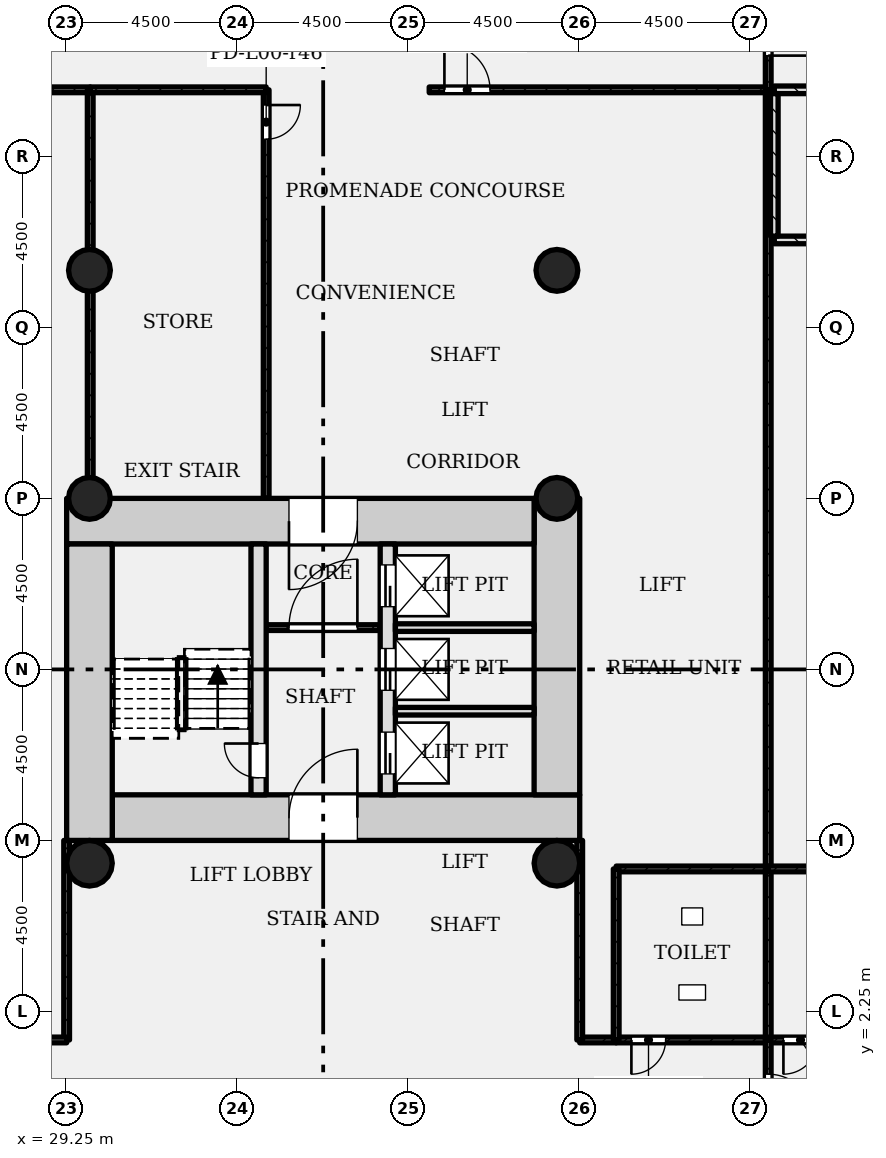
"""IFC4 building model, lengths in metres.
Left out: names, types, materials, properties, quantities, classifications, styles, units other than length and angle.
Written with IfcOpenShell. Run it as: python <this file> out.ifc"""

import sys

from ifc_helpers import new_model, si_unit, direction, frame, frame_2d, origin, origin_2d, place, context, subcontext, project, spatial, rectangle, hollow_circle, extrude, element, fill, save


model = new_model("IFC4")
c1 = context("Model", 3, precision=1e-05, world=origin(), true_north=direction((0.0, 1.0)))
c2 = subcontext(c1, "Body", "Model", "MODEL_VIEW")
j1 = project(units=[si_unit("LENGTHUNIT", "METRE"), si_unit("PLANEANGLEUNIT", "RADIAN")], contexts=[c1])
p1 = place(None, origin())
s1 = spatial("IfcSite", under=j1, at=p1, CompositionType="ELEMENT")
p2 = place(p1, origin())
s2 = spatial("IfcBuilding", under=s1, at=p2, CompositionType="ELEMENT")
p3 = place(p2, origin())
s3 = spatial("IfcBuildingStorey", under=s2, at=p3, CompositionType="ELEMENT", Elevation=0.0)
p4 = place(p3, frame((30.45, 7.35, -0.4), z_axis=(0.0, 0.0, 1.0), x_axis=(1.0, 0.0, 0.0)))
e1 = element("IfcWall", 1, at=p4, inside=s3, PredefinedType="SHEAR", context=c2, shape_type="SweptSolid", body=[
    extrude(rectangle(XDim=12.3, YDim=1.2, at=frame_2d((6.15, 0.0))), origin(), (0.0, 0.0, 1.0), 6.4),
])
p5 = place(p4, frame((4.65, 0.0, 0.4)))
e2 = element("IfcOpeningElement", 2, at=p5, cuts=e1, PredefinedType="OPENING", context=c2, shape_type="SweptSolid", body=[
    extrude(rectangle(XDim=1.8, YDim=2.1, at=frame_2d((0.9, 1.05))), frame((0.0, 0.61, 0.0), z_axis=(0.0, -1.0, 0.0), x_axis=(1.0, 0.0, 0.0)), (0.0, 0.0, 1.0), 1.22),
])
p6 = place(p3, frame((42.15, 7.95, -0.4), z_axis=(0.0, 0.0, 1.0), x_axis=(0.0, 1.0, 0.0)))
e3 = element("IfcWall", 3, at=p6, inside=s3, PredefinedType="SHEAR", context=c2, shape_type="SweptSolid", body=[
    extrude(rectangle(XDim=7.8, YDim=1.2, at=frame_2d((3.9, 0.0))), origin(), (0.0, 0.0, 1.0), 6.4),
])
p7 = place(p3, frame((41.55, 15.15, -0.4), z_axis=(0.0, 0.0, 1.0), x_axis=(-1.0, 0.0, 0.0)))
e4 = element("IfcWall", 4, at=p7, inside=s3, PredefinedType="SHEAR", context=c2, shape_type="SweptSolid", body=[
    extrude(rectangle(XDim=12.3, YDim=1.2, at=frame_2d((6.15, 0.0))), origin(), (0.0, 0.0, 1.0), 6.4),
])
p8 = place(p7, frame((4.65, 0.0, 0.4)))
e5 = element("IfcOpeningElement", 5, at=p8, cuts=e4, PredefinedType="OPENING", context=c2, shape_type="SweptSolid", body=[
    extrude(rectangle(XDim=1.8, YDim=2.1, at=frame_2d((0.9, 1.05))), frame((0.0, 0.61, 0.0), z_axis=(0.0, -1.0, 0.0), x_axis=(1.0, 0.0, 0.0)), (0.0, 0.0, 1.0), 1.22),
])
p9 = place(p3, frame((29.85, 14.55, -0.4), z_axis=(0.0, 0.0, 1.0), x_axis=(0.0, -1.0, 0.0)))
e6 = element("IfcWall", 6, at=p9, inside=s3, PredefinedType="SHEAR", context=c2, shape_type="SweptSolid", body=[
    extrude(rectangle(XDim=7.8, YDim=1.2, at=frame_2d((3.9, 0.0))), origin(), (0.0, 0.0, 1.0), 6.4),
])
p10 = place(p3, frame((34.3, 7.95, -0.4), z_axis=(0.0, 0.0, 1.0), x_axis=(0.0, 1.0, 0.0)))
e7 = element("IfcWall", 7, at=p10, inside=s3, PredefinedType="SHEAR", context=c2, shape_type="SweptSolid", body=[
    extrude(rectangle(XDim=6.6, YDim=0.4, at=frame_2d((3.3, 0.0))), origin(), (0.0, 0.0, 1.0), 6.4),
])
p11 = place(p10, frame((0.45, 0.0, 0.4)))
e8 = element("IfcOpeningElement", 8, at=p11, cuts=e7, PredefinedType="OPENING", context=c2, shape_type="SweptSolid", body=[
    extrude(rectangle(XDim=0.9, YDim=2.1, at=frame_2d((0.45, 1.05))), frame((0.0, 0.21, 0.0), z_axis=(0.0, -1.0, 0.0), x_axis=(1.0, 0.0, 0.0)), (0.0, 0.0, 1.0), 0.42),
])
p12 = place(p3, frame((37.7, 7.95, -0.4), z_axis=(0.0, 0.0, 1.0), x_axis=(0.0, 1.0, 0.0)))
e9 = element("IfcWall", 9, at=p12, inside=s3, PredefinedType="SHEAR", context=c2, shape_type="SweptSolid", body=[
    extrude(rectangle(XDim=6.6, YDim=0.4, at=frame_2d((3.3, 0.0))), origin(), (0.0, 0.0, 1.0), 6.4),
])
p13 = place(p12, frame((0.55, 0.0, 0.4)))
e10 = element("IfcOpeningElement", 10, at=p13, cuts=e9, PredefinedType="OPENING", context=c2, shape_type="SweptSolid", body=[
    extrude(rectangle(XDim=1.1, YDim=2.1, at=frame_2d((0.55, 1.05))), frame((0.0, 0.21, 0.0), z_axis=(0.0, -1.0, 0.0), x_axis=(1.0, 0.0, 0.0)), (0.0, 0.0, 1.0), 0.42),
])
p14 = place(p12, frame((2.75, 0.0, 0.4)))
e11 = element("IfcOpeningElement", 11, at=p14, cuts=e9, PredefinedType="OPENING", context=c2, shape_type="SweptSolid", body=[
    extrude(rectangle(XDim=1.1, YDim=2.1, at=frame_2d((0.55, 1.05))), frame((0.0, 0.21, 0.0), z_axis=(0.0, -1.0, 0.0), x_axis=(1.0, 0.0, 0.0)), (0.0, 0.0, 1.0), 0.42),
])
p15 = place(p12, frame((4.95, 0.0, 0.4)))
e12 = element("IfcOpeningElement", 12, at=p15, cuts=e9, PredefinedType="OPENING", context=c2, shape_type="SweptSolid", body=[
    extrude(rectangle(XDim=1.1, YDim=2.1, at=frame_2d((0.55, 1.05))), frame((0.0, 0.21, 0.0), z_axis=(0.0, -1.0, 0.0), x_axis=(1.0, 0.0, 0.0)), (0.0, 0.0, 1.0), 0.42),
])
for number, where, z_axis, x_axis in (
    (13, (42.15, 15.75, -0.4), (0.0, 0.0, 1.0), (1.0, 0.0, 0.0)),
    (14, (29.85, 15.75, -0.4), (0.0, 0.0, 1.0), (1.0, 0.0, 0.0)),
    (15, (42.15, 21.75, -0.4), (0.0, 0.0, 1.0), (1.0, 0.0, 0.0)),
    (16, (29.85, 21.75, -0.4), (0.0, 0.0, 1.0), (1.0, 0.0, 0.0)),
):
    element("IfcColumn", number, at=place(p3, frame(where, z_axis=z_axis, x_axis=x_axis)), inside=s3, PredefinedType="COLUMN", context=c2, shape_type="SweptSolid", body=[
        extrude(hollow_circle(Radius=0.55, WallThickness=0.04, at=origin_2d()), origin(), (0.0, 0.0, 1.0), 6.4),
    ])
for number, where, z_axis, x_axis in (
    (17, (42.15, 6.15, -0.4), (0.0, 0.0, 1.0), (1.0, 0.0, 0.0)),
    (18, (29.85, 6.15, -0.4), (0.0, 0.0, 1.0), (1.0, 0.0, 0.0)),
):
    element("IfcColumn", number, at=place(p3, frame(where, z_axis=z_axis, x_axis=x_axis)), inside=s3, PredefinedType="COLUMN", context=c2, shape_type="SweptSolid", body=[
        extrude(hollow_circle(Radius=0.6, WallThickness=0.045, at=origin_2d()), origin(), (0.0, 0.0, 1.0), 6.4),
    ])
p16 = place(p3, frame((37.5, 12.35, 0.0), z_axis=(0.0, 0.0, 1.0), x_axis=(-1.0, 0.0, 0.0)))
e19 = element("IfcWall", 19, at=p16, inside=s3, PredefinedType="PARTITIONING", context=c2, shape_type="SweptSolid", body=[
    extrude(rectangle(XDim=3.0, YDim=0.15, at=frame_2d((1.5, 0.0))), origin(), (0.0, 0.0, 1.0), 5.58),
])
p17 = place(p16, frame((0.6, 0.0, 0.0)))
e20 = element("IfcOpeningElement", 20, at=p17, cuts=e19, PredefinedType="OPENING", context=c2, shape_type="SweptSolid", body=[
    extrude(rectangle(XDim=1.8, YDim=2.1, at=frame_2d((0.9, 1.05))), frame((0.0, 0.085, 0.0), z_axis=(0.0, -1.0, 0.0), x_axis=(1.0, 0.0, 0.0)), (0.0, 0.0, 1.0), 0.17),
])
for number, where, z_axis, x_axis in (
    (21, (41.55, 10.15, 0.0), (0.0, 0.0, 1.0), (-1.0, 0.0, 0.0)),
    (22, (41.55, 12.35, 0.0), (0.0, 0.0, 1.0), (-1.0, 0.0, 0.0)),
):
    element("IfcWall", number, at=place(p3, frame(where, z_axis=z_axis, x_axis=x_axis)), inside=s3, PredefinedType="SOLIDWALL", context=c2, shape_type="SweptSolid", body=[
        extrude(rectangle(XDim=3.65, YDim=0.2, at=frame_2d((1.825, 0.0))), origin(), (0.0, 0.0, 1.0), 5.58),
    ])
p18 = place(p3, frame((20.95, 26.5, 0.0), z_axis=(0.0, 0.0, 1.0), x_axis=(1.0, 0.0, 0.0)))
e23 = element("IfcWall", 23, at=p18, inside=s3, PredefinedType="PARTITIONING", context=c2, shape_type="SweptSolid", body=[
    extrude(rectangle(XDim=8.92, YDim=0.15, at=frame_2d((4.46, 0.0))), origin(), (0.0, 0.0, 1.0), 5.58),
])
p19 = place(p18, frame((0.4, 0.0, 0.0)))
e24 = element("IfcOpeningElement", 24, at=p19, cuts=e23, PredefinedType="OPENING", context=c2, shape_type="SweptSolid", body=[
    extrude(rectangle(XDim=1.2, YDim=2.1, at=frame_2d((0.6, 1.05))), frame((0.0, 0.085, 0.0), z_axis=(0.0, -1.0, 0.0), x_axis=(1.0, 0.0, 0.0)), (0.0, 0.0, 1.0), 0.17),
])
p20 = place(p3, frame((29.25, 6.75, 0.0), z_axis=(0.0, 0.0, 1.0), x_axis=(0.0, -1.0, 0.0)))
e25 = element("IfcWall", 25, at=p20, inside=s3, PredefinedType="PARTITIONING", context=c2, shape_type="SweptSolid", body=[
    extrude(rectangle(XDim=5.25, YDim=0.15, at=frame_2d((2.625, 0.0))), origin(), (0.0, 0.0, 1.0), 5.58),
])
p21 = place(p3, frame((29.25, 1.5, 0.0), z_axis=(0.0, 0.0, 1.0), x_axis=(-1.0, 0.0, 0.0)))
e26 = element("IfcWall", 26, at=p21, inside=s3, PredefinedType="PARTITIONING", context=c2, shape_type="SweptSolid", body=[
    extrude(rectangle(XDim=8.3, YDim=0.15, at=frame_2d((4.15, 0.0))), origin(), (0.0, 0.0, 1.0), 5.58),
])
p22 = place(p3, frame((29.87, 26.5, 0.0), z_axis=(0.0, 0.0, 1.0), x_axis=(0.0, -1.0, 0.0)))
e27 = element("IfcWall", 27, at=p22, inside=s3, PredefinedType="PARTITIONING", context=c2, shape_type="SweptSolid", body=[
    extrude(rectangle(XDim=10.75, YDim=0.15, at=frame_2d((5.375, 0.0))), origin(), (0.0, 0.0, 1.0), 5.58),
])
p23 = place(p3, frame((34.5, 26.5, 0.0), z_axis=(0.0, 0.0, 1.0), x_axis=(0.0, -1.0, 0.0)))
e28 = element("IfcWall", 28, at=p23, inside=s3, PredefinedType="PARTITIONING", context=c2, shape_type="SweptSolid", body=[
    extrude(rectangle(XDim=10.75, YDim=0.15, at=frame_2d((5.375, 0.0))), origin(), (0.0, 0.0, 1.0), 5.58),
])
p24 = place(p23, frame((0.4, 0.0, 0.0)))
e29 = element("IfcOpeningElement", 29, at=p24, cuts=e28, PredefinedType="OPENING", context=c2, shape_type="SweptSolid", body=[
    extrude(rectangle(XDim=0.9, YDim=2.1, at=frame_2d((0.45, 1.05))), frame((0.0, 0.085, 0.0), z_axis=(0.0, -1.0, 0.0), x_axis=(1.0, 0.0, 0.0)), (0.0, 0.0, 1.0), 0.17),
])
p25 = place(p3, frame((29.87, 26.5, 0.0), z_axis=(0.0, 0.0, 1.0), x_axis=(1.0, 0.0, 0.0)))
e30 = element("IfcWall", 30, at=p25, inside=s3, PredefinedType="PARTITIONING", context=c2, shape_type="SweptSolid", body=[
    extrude(rectangle(XDim=4.63, YDim=0.15, at=frame_2d((2.315, 0.0))), origin(), (0.0, 0.0, 1.0), 5.58),
])
p26 = place(p3, frame((43.71, 1.5, 0.0), z_axis=(0.0, 0.0, 1.0), x_axis=(-1.0, 0.0, 0.0)))
e31 = element("IfcWall", 31, at=p26, inside=s3, PredefinedType="PARTITIONING", context=c2, shape_type="SweptSolid", body=[
    extrude(rectangle(XDim=0.96, YDim=0.15, at=frame_2d((0.48, 0.0))), origin(), (0.0, 0.0, 1.0), 5.58),
])
p27 = place(p3, frame((42.75, 1.5, 0.0), z_axis=(0.0, 0.0, 1.0), x_axis=(0.0, 1.0, 0.0)))
e32 = element("IfcWall", 32, at=p27, inside=s3, PredefinedType="PARTITIONING", context=c2, shape_type="SweptSolid", body=[
    extrude(rectangle(XDim=5.25, YDim=0.15, at=frame_2d((2.625, 0.0))), origin(), (0.0, 0.0, 1.0), 5.58),
])
p28 = place(p3, frame((38.79, 26.5, 0.0), z_axis=(0.0, 0.0, 1.0), x_axis=(1.0, 0.0, 0.0)))
e33 = element("IfcWall", 33, at=p28, inside=s3, PredefinedType="PARTITIONING", context=c2, shape_type="SweptSolid", body=[
    extrude(rectangle(XDim=8.92, YDim=0.15, at=frame_2d((4.46, 0.0))), origin(), (0.0, 0.0, 1.0), 5.58),
])
p29 = place(p28, frame((0.4, 0.0, 0.0)))
e34 = element("IfcOpeningElement", 34, at=p29, cuts=e33, PredefinedType="OPENING", context=c2, shape_type="SweptSolid", body=[
    extrude(rectangle(XDim=1.2, YDim=2.1, at=frame_2d((0.6, 1.05))), frame((0.0, 0.085, 0.0), z_axis=(0.0, -1.0, 0.0), x_axis=(1.0, 0.0, 0.0)), (0.0, 0.0, 1.0), 0.17),
])
p30 = place(p3, frame((47.71, 26.5, 0.0), z_axis=(0.0, 0.0, 1.0), x_axis=(0.0, -1.0, 0.0)))
e35 = element("IfcWall", 35, at=p30, inside=s3, PredefinedType="PARTITIONING", context=c2, shape_type="SweptSolid", body=[
    extrude(rectangle(XDim=20.5, YDim=0.15, at=frame_2d((10.25, 0.0))), origin(), (0.0, 0.0, 1.0), 5.58),
])
p31 = place(p3, frame((43.71, 1.5, 0.0), z_axis=(0.0, 0.0, 1.0), x_axis=(1.0, 0.0, 0.0)))
e36 = element("IfcWall", 36, at=p31, inside=s3, PredefinedType="PARTITIONING", context=c2, shape_type="SweptSolid", body=[
    extrude(rectangle(XDim=4.0, YDim=0.15, at=frame_2d((2.0, 0.0))), origin(), (0.0, 0.0, 1.0), 5.58),
])
p32 = place(p31, frame((0.4, 0.0, 0.0)))
e37 = element("IfcOpeningElement", 37, at=p32, cuts=e36, PredefinedType="OPENING", context=c2, shape_type="SweptSolid", body=[
    extrude(rectangle(XDim=0.9, YDim=2.1, at=frame_2d((0.45, 1.05))), frame((0.0, 0.085, 0.0), z_axis=(0.0, -1.0, 0.0), x_axis=(1.0, 0.0, 0.0)), (0.0, 0.0, 1.0), 0.17),
])
p33 = place(p3, frame((47.71, 6.0, 0.0), z_axis=(0.0, 0.0, 1.0), x_axis=(-1.0, 0.0, 0.0)))
e38 = element("IfcWall", 38, at=p33, inside=s3, PredefinedType="PARTITIONING", context=c2, shape_type="SweptSolid", body=[
    extrude(rectangle(XDim=4.0, YDim=0.15, at=frame_2d((2.0, 0.0))), origin(), (0.0, 0.0, 1.0), 5.58),
])
for number, where, z_axis, x_axis in (
    (39, (43.71, 6.0, 0.0), (0.0, 0.0, 1.0), (0.0, -1.0, 0.0)),
    (40, (47.71, 1.5, 0.0), (0.0, 0.0, 1.0), (0.0, 1.0, 0.0)),
):
    element("IfcWall", number, at=place(p3, frame(where, z_axis=z_axis, x_axis=x_axis)), inside=s3, PredefinedType="PARTITIONING", context=c2, shape_type="SweptSolid", body=[
        extrude(rectangle(XDim=4.5, YDim=0.15, at=frame_2d((2.25, 0.0))), origin(), (0.0, 0.0, 1.0), 5.58),
    ])
p34 = place(p3, frame((47.71, 1.5, 0.0), z_axis=(0.0, 0.0, 1.0), x_axis=(1.0, 0.0, 0.0)))
e41 = element("IfcWall", 41, at=p34, inside=s3, PredefinedType="PARTITIONING", context=c2, shape_type="SweptSolid", body=[
    extrude(rectangle(XDim=4.0, YDim=0.15, at=frame_2d((2.0, 0.0))), origin(), (0.0, 0.0, 1.0), 5.58),
])
p35 = place(p34, frame((0.4, 0.0, 0.0)))
e42 = element("IfcOpeningElement", 42, at=p35, cuts=e41, PredefinedType="OPENING", context=c2, shape_type="SweptSolid", body=[
    extrude(rectangle(XDim=0.9, YDim=2.1, at=frame_2d((0.45, 1.05))), frame((0.0, 0.085, 0.0), z_axis=(0.0, -1.0, 0.0), x_axis=(1.0, 0.0, 0.0)), (0.0, 0.0, 1.0), 0.17),
])
p36 = place(p3, frame((51.71, 6.0, 0.0), z_axis=(0.0, 0.0, 1.0), x_axis=(-1.0, 0.0, 0.0)))
e43 = element("IfcWall", 43, at=p36, inside=s3, PredefinedType="PARTITIONING", context=c2, shape_type="SweptSolid", body=[
    extrude(rectangle(XDim=4.0, YDim=0.15, at=frame_2d((2.0, 0.0))), origin(), (0.0, 0.0, 1.0), 5.58),
])
p37 = place(p3, frame((47.71, 26.5, 0.0), z_axis=(0.0, 0.0, 1.0), x_axis=(0.0, 1.0, 0.0)))
e44 = element("IfcWall", 44, at=p37, inside=s3, PredefinedType="PARTITIONING", context=c2, shape_type="SweptSolid", body=[
    extrude(rectangle(XDim=3.0, YDim=0.15, at=frame_2d((1.5, 0.0))), origin(), (0.0, 0.0, 1.0), 5.58),
])
p38 = place(p37, frame((0.9, 0.0, 0.0)))
e45 = element("IfcOpeningElement", 45, at=p38, cuts=e44, PredefinedType="OPENING", context=c2, shape_type="SweptSolid", body=[
    extrude(rectangle(XDim=1.2, YDim=2.1, at=frame_2d((0.6, 1.05))), frame((0.0, 0.085, 0.0), z_axis=(0.0, -1.0, 0.0), x_axis=(1.0, 0.0, 0.0)), (0.0, 0.0, 1.0), 0.17),
])
p39 = place(p3, frame((47.71, -1.5, 0.0), z_axis=(0.0, 0.0, 1.0), x_axis=(0.0, 1.0, 0.0)))
e46 = element("IfcWall", 46, at=p39, inside=s3, PredefinedType="PARTITIONING", context=c2, shape_type="SweptSolid", body=[
    extrude(rectangle(XDim=3.0, YDim=0.15, at=frame_2d((1.5, 0.0))), origin(), (0.0, 0.0, 1.0), 5.58),
])
p40 = place(p39, frame((0.9, 0.0, 0.0)))
e47 = element("IfcOpeningElement", 47, at=p40, cuts=e46, PredefinedType="OPENING", context=c2, shape_type="SweptSolid", body=[
    extrude(rectangle(XDim=1.2, YDim=2.1, at=frame_2d((0.6, 1.05))), frame((0.0, 0.085, 0.0), z_axis=(0.0, -1.0, 0.0), x_axis=(1.0, 0.0, 0.0)), (0.0, 0.0, 1.0), 0.17),
])
p41 = place(p3, frame((47.87, 26.5, 0.0), z_axis=(0.0, 0.0, 1.0), x_axis=(1.0, 0.0, 0.0)))
e48 = element("IfcWall", 48, at=p41, inside=s3, PredefinedType="SHEAR", context=c2, shape_type="SweptSolid", body=[
    extrude(rectangle(XDim=6.8, YDim=0.2, at=frame_2d((3.4, 0.0))), origin(), (0.0, 0.0, 1.0), 5.58),
])
p42 = place(p41, frame((5.35, 0.0, 0.0)))
e49 = element("IfcOpeningElement", 49, at=p42, cuts=e48, PredefinedType="OPENING", context=c2, shape_type="SweptSolid", body=[
    extrude(rectangle(XDim=0.9, YDim=2.1, at=frame_2d((0.45, 1.05))), frame((0.0, 0.11, 0.0), z_axis=(0.0, -1.0, 0.0), x_axis=(1.0, 0.0, 0.0)), (0.0, 0.0, 1.0), 0.22),
])
p43 = place(p3, frame((47.87, 22.55, 0.0), z_axis=(0.0, 0.0, 1.0), x_axis=(1.0, 0.0, 0.0)))
e50 = element("IfcWall", 50, at=p43, inside=s3, PredefinedType="SHEAR", context=c2, shape_type="SweptSolid", body=[
    extrude(rectangle(XDim=6.8, YDim=0.2, at=frame_2d((3.4, 0.0))), origin(), (0.0, 0.0, 1.0), 5.58),
])
p44 = place(p3, frame((47.87, 22.65, 0.0), z_axis=(0.0, 0.0, 1.0), x_axis=(0.0, 1.0, 0.0)))
e51 = element("IfcWall", 51, at=p44, inside=s3, PredefinedType="SHEAR", context=c2, shape_type="SweptSolid", body=[
    extrude(rectangle(XDim=3.75, YDim=0.2, at=frame_2d((1.875, 0.0))), origin(), (0.0, 0.0, 1.0), 5.58),
])
p45 = place(p17, origin())
e52 = element("IfcDoor", 52, at=p45, inside=s3, OperationType="SINGLE_SWING_LEFT", PredefinedType="DOOR", context=c2, shape_type="SweptSolid", body=[
    extrude(rectangle(XDim=1.8, YDim=2.1, at=frame_2d((0.9, 1.05))), frame((0.0, 0.025, 0.0), z_axis=(0.0, -1.0, 0.0), x_axis=(1.0, 0.0, 0.0)), (0.0, 0.0, 1.0), 0.05),
])
fill(e20, e52)
p46 = place(p24, origin())
e53 = element("IfcDoor", 53, at=p46, inside=s3, OperationType="SINGLE_SWING_RIGHT", PredefinedType="DOOR", context=c2, shape_type="SweptSolid", body=[
    extrude(rectangle(XDim=0.9, YDim=2.1, at=frame_2d((0.45, 1.05))), frame((0.0, 0.025, 0.0), z_axis=(0.0, -1.0, 0.0), x_axis=(1.0, 0.0, 0.0)), (0.0, 0.0, 1.0), 0.05),
])
fill(e29, e53)
p47 = place(p29, origin())
e54 = element("IfcDoor", 54, at=p47, inside=s3, OperationType="SINGLE_SWING_RIGHT", PredefinedType="DOOR", context=c2, shape_type="SweptSolid", body=[
    extrude(rectangle(XDim=1.2, YDim=2.1, at=frame_2d((0.6, 1.05))), frame((0.0, 0.025, 0.0), z_axis=(0.0, -1.0, 0.0), x_axis=(1.0, 0.0, 0.0)), (0.0, 0.0, 1.0), 0.05),
])
fill(e34, e54)
p48 = place(p32, origin())
e55 = element("IfcDoor", 55, at=p48, inside=s3, OperationType="SINGLE_SWING_LEFT", PredefinedType="DOOR", context=c2, shape_type="SweptSolid", body=[
    extrude(rectangle(XDim=0.9, YDim=2.1, at=frame_2d((0.45, 1.05))), frame((0.0, 0.025, 0.0), z_axis=(0.0, -1.0, 0.0), x_axis=(1.0, 0.0, 0.0)), (0.0, 0.0, 1.0), 0.05),
])
fill(e37, e55)
p49 = place(p35, origin())
e56 = element("IfcDoor", 56, at=p49, inside=s3, OperationType="SINGLE_SWING_LEFT", PredefinedType="DOOR", context=c2, shape_type="SweptSolid", body=[
    extrude(rectangle(XDim=0.9, YDim=2.1, at=frame_2d((0.45, 1.05))), frame((0.0, 0.025, 0.0), z_axis=(0.0, -1.0, 0.0), x_axis=(1.0, 0.0, 0.0)), (0.0, 0.0, 1.0), 0.05),
])
fill(e42, e56)
p50 = place(p38, origin())
e57 = element("IfcDoor", 57, at=p50, inside=s3, OperationType="SINGLE_SWING_LEFT", PredefinedType="DOOR", context=c2, shape_type="SweptSolid", body=[
    extrude(rectangle(XDim=1.2, YDim=2.1, at=frame_2d((0.6, 1.05))), frame((0.0, 0.025, 0.0), z_axis=(0.0, -1.0, 0.0), x_axis=(1.0, 0.0, 0.0)), (0.0, 0.0, 1.0), 0.05),
])
fill(e45, e57)
p51 = place(p40, origin())
e58 = element("IfcDoor", 58, at=p51, inside=s3, OperationType="SINGLE_SWING_LEFT", PredefinedType="DOOR", context=c2, shape_type="SweptSolid", body=[
    extrude(rectangle(XDim=1.2, YDim=2.1, at=frame_2d((0.6, 1.05))), frame((0.0, 0.025, 0.0), z_axis=(0.0, -1.0, 0.0), x_axis=(1.0, 0.0, 0.0)), (0.0, 0.0, 1.0), 0.05),
])
fill(e47, e58)
p52 = place(p11, origin())
e59 = element("IfcDoor", 59, at=p52, inside=s3, OperationType="SINGLE_SWING_LEFT", PredefinedType="DOOR", context=c2, shape_type="SweptSolid", body=[
    extrude(rectangle(XDim=0.9, YDim=2.1, at=frame_2d((0.45, 1.05))), frame((0.0, 0.025, 0.0), z_axis=(0.0, -1.0, 0.0), x_axis=(1.0, 0.0, 0.0)), (0.0, 0.0, 1.0), 0.05),
])
fill(e8, e59)
p53 = place(p13, origin())
e60 = element("IfcDoor", 60, at=p53, inside=s3, OperationType="SLIDING_TO_LEFT", PredefinedType="DOOR", context=c2, shape_type="SweptSolid", body=[
    extrude(rectangle(XDim=1.1, YDim=2.1, at=frame_2d((0.55, 1.05))), frame((0.0, 0.025, 0.0), z_axis=(0.0, -1.0, 0.0), x_axis=(1.0, 0.0, 0.0)), (0.0, 0.0, 1.0), 0.05),
])
fill(e10, e60)
p54 = place(p14, origin())
e61 = element("IfcDoor", 61, at=p54, inside=s3, OperationType="SLIDING_TO_LEFT", PredefinedType="DOOR", context=c2, shape_type="SweptSolid", body=[
    extrude(rectangle(XDim=1.1, YDim=2.1, at=frame_2d((0.55, 1.05))), frame((0.0, 0.025, 0.0), z_axis=(0.0, -1.0, 0.0), x_axis=(1.0, 0.0, 0.0)), (0.0, 0.0, 1.0), 0.05),
])
fill(e11, e61)
p55 = place(p15, origin())
e62 = element("IfcDoor", 62, at=p55, inside=s3, OperationType="SLIDING_TO_LEFT", PredefinedType="DOOR", context=c2, shape_type="SweptSolid", body=[
    extrude(rectangle(XDim=1.1, YDim=2.1, at=frame_2d((0.55, 1.05))), frame((0.0, 0.025, 0.0), z_axis=(0.0, -1.0, 0.0), x_axis=(1.0, 0.0, 0.0)), (0.0, 0.0, 1.0), 0.05),
])
fill(e12, e62)
p56 = place(p5, origin())
e63 = element("IfcDoor", 63, at=p56, inside=s3, OperationType="SINGLE_SWING_LEFT", PredefinedType="DOOR", context=c2, shape_type="SweptSolid", body=[
    extrude(rectangle(XDim=1.8, YDim=2.1, at=frame_2d((0.9, 1.05))), frame((0.0, 0.025, 0.0), z_axis=(0.0, -1.0, 0.0), x_axis=(1.0, 0.0, 0.0)), (0.0, 0.0, 1.0), 0.05),
])
fill(e2, e63)
p57 = place(p8, origin())
e64 = element("IfcDoor", 64, at=p57, inside=s3, OperationType="SINGLE_SWING_LEFT", PredefinedType="DOOR", context=c2, shape_type="SweptSolid", body=[
    extrude(rectangle(XDim=1.8, YDim=2.1, at=frame_2d((0.9, 1.05))), frame((0.0, 0.025, 0.0), z_axis=(0.0, -1.0, 0.0), x_axis=(1.0, 0.0, 0.0)), (0.0, 0.0, 1.0), 0.05),
])
fill(e5, e64)
save(model, sys.argv[1])
